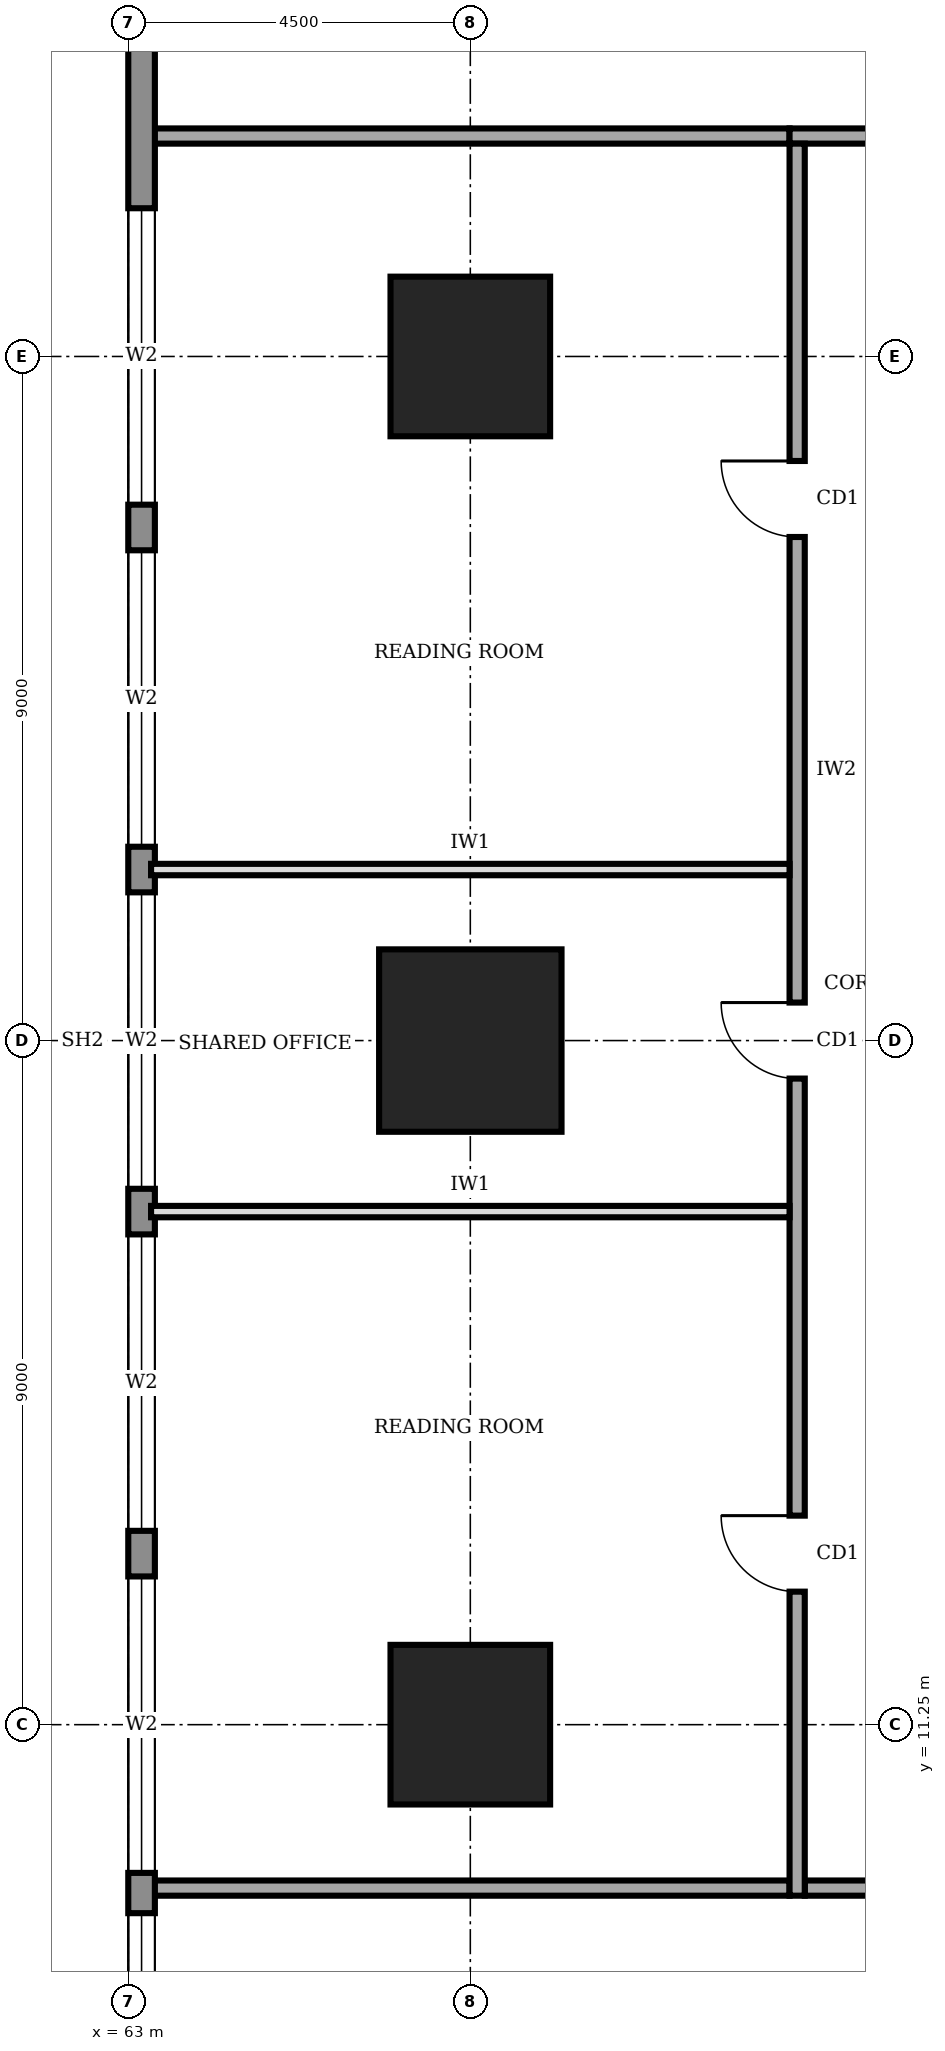
"""IFC4 building model, lengths in metres.
Left out: names, types, materials, properties, quantities, classifications, styles, units other than length and angle.
Written with IfcOpenShell. Run it as: python <this file> out.ifc"""

import sys

from ifc_helpers import new_model, si_unit, direction, frame, frame_2d, origin, origin_2d, place, context, subcontext, project, spatial, rectangle, extrude, element, fill, save


model = new_model("IFC4")
c1 = context("Model", 3, precision=1e-05, world=origin(), true_north=direction((0.0, 1.0)))
c2 = subcontext(c1, "Body", "Model", "MODEL_VIEW")
j1 = project(units=[si_unit("LENGTHUNIT", "METRE"), si_unit("PLANEANGLEUNIT", "RADIAN")], contexts=[c1])
p1 = place(None, origin())
s1 = spatial("IfcSite", under=j1, at=p1, CompositionType="ELEMENT")
p2 = place(p1, origin())
s2 = spatial("IfcBuilding", under=s1, at=p2, CompositionType="ELEMENT")
p3 = place(p2, frame((0.0, 0.0, 57.0)))
s3 = spatial("IfcBuildingStorey", under=s2, at=p3, CompositionType="ELEMENT", Elevation=57.0)
p4 = place(p3, frame((67.5, 11.25, 0.0), z_axis=(0.0, 0.0, 1.0), x_axis=(1.0, 0.0, 0.0)))
e1 = element("IfcColumn", 1, at=p4, inside=s3, PredefinedType="COLUMN", context=c2, shape_type="SweptSolid", body=[
    extrude(rectangle(XDim=2.1, YDim=2.1, at=origin_2d()), origin(), (0.0, 0.0, 1.0), 4.0),
])
p5 = place(p3, frame((67.5, 20.25, 0.0), z_axis=(0.0, 0.0, 1.0), x_axis=(1.0, 0.0, 0.0)))
e2 = element("IfcColumn", 2, at=p5, inside=s3, PredefinedType="COLUMN", context=c2, shape_type="SweptSolid", body=[
    extrude(rectangle(XDim=2.4, YDim=2.4, at=origin_2d()), origin(), (0.0, 0.0, 1.0), 4.0),
])
p6 = place(p3, frame((67.5, 29.25, 0.0), z_axis=(0.0, 0.0, 1.0), x_axis=(1.0, 0.0, 0.0)))
e3 = element("IfcColumn", 3, at=p6, inside=s3, PredefinedType="COLUMN", context=c2, shape_type="SweptSolid", body=[
    extrude(rectangle(XDim=2.1, YDim=2.1, at=origin_2d()), origin(), (0.0, 0.0, 1.0), 4.0),
])
p7 = place(p3, frame((63.175, 35.98, 0.0), z_axis=(0.0, 0.0, 1.0), x_axis=(0.0, -1.0, 0.0)))
e4 = element("IfcWall", 4, at=p7, inside=s3, PredefinedType="STANDARD", context=c2, shape_type="SweptSolid", body=[
    extrude(rectangle(XDim=31.46, YDim=0.35, at=frame_2d((15.73, 0.0))), origin(), (0.0, 0.0, 1.0), 3.75),
])
p8 = place(p7, frame((27.21, 0.0, 0.6)))
e5 = element("IfcOpeningElement", 5, at=p8, cuts=e4, PredefinedType="OPENING", context=c2, shape_type="SweptSolid", body=[
    extrude(rectangle(XDim=3.9, YDim=2.6, at=frame_2d((1.95, 1.3))), frame((0.0, 0.185, 0.0), z_axis=(0.0, -1.0, 0.0), x_axis=(1.0, 0.0, 0.0)), (0.0, 0.0, 1.0), 0.37),
])
p9 = place(p7, frame((22.78, 0.0, 0.6)))
e6 = element("IfcOpeningElement", 6, at=p9, cuts=e4, PredefinedType="OPENING", context=c2, shape_type="SweptSolid", body=[
    extrude(rectangle(XDim=3.9, YDim=2.6, at=frame_2d((1.95, 1.3))), frame((0.0, 0.185, 0.0), z_axis=(0.0, -1.0, 0.0), x_axis=(1.0, 0.0, 0.0)), (0.0, 0.0, 1.0), 0.37),
])
p10 = place(p7, frame((18.28, 0.0, 0.6)))
e7 = element("IfcOpeningElement", 7, at=p10, cuts=e4, PredefinedType="OPENING", context=c2, shape_type="SweptSolid", body=[
    extrude(rectangle(XDim=3.9, YDim=2.6, at=frame_2d((1.95, 1.3))), frame((0.0, 0.185, 0.0), z_axis=(0.0, -1.0, 0.0), x_axis=(1.0, 0.0, 0.0)), (0.0, 0.0, 1.0), 0.37),
])
p11 = place(p7, frame((13.78, 0.0, 0.6)))
e8 = element("IfcOpeningElement", 8, at=p11, cuts=e4, PredefinedType="OPENING", context=c2, shape_type="SweptSolid", body=[
    extrude(rectangle(XDim=3.9, YDim=2.6, at=frame_2d((1.95, 1.3))), frame((0.0, 0.185, 0.0), z_axis=(0.0, -1.0, 0.0), x_axis=(1.0, 0.0, 0.0)), (0.0, 0.0, 1.0), 0.37),
])
p12 = place(p7, frame((9.28, 0.0, 0.6)))
e9 = element("IfcOpeningElement", 9, at=p12, cuts=e4, PredefinedType="OPENING", context=c2, shape_type="SweptSolid", body=[
    extrude(rectangle(XDim=3.9, YDim=2.6, at=frame_2d((1.95, 1.3))), frame((0.0, 0.185, 0.0), z_axis=(0.0, -1.0, 0.0), x_axis=(1.0, 0.0, 0.0)), (0.0, 0.0, 1.0), 0.37),
])
p13 = place(p7, frame((4.78, 0.0, 0.6)))
e10 = element("IfcOpeningElement", 10, at=p13, cuts=e4, PredefinedType="OPENING", context=c2, shape_type="SweptSolid", body=[
    extrude(rectangle(XDim=3.9, YDim=2.6, at=frame_2d((1.95, 1.3))), frame((0.0, 0.185, 0.0), z_axis=(0.0, -1.0, 0.0), x_axis=(1.0, 0.0, 0.0)), (0.0, 0.0, 1.0), 0.37),
])
p14 = place(p3, frame((71.9, 9.1, 0.0), z_axis=(0.0, 0.0, 1.0), x_axis=(1.0, 0.0, 0.0)))
e11 = element("IfcWall", 11, at=p14, inside=s3, PredefinedType="SOLIDWALL", context=c2, shape_type="SweptSolid", body=[
    extrude(rectangle(XDim=17.65, YDim=0.2, at=frame_2d((8.825, 0.0))), origin(), (0.0, 0.0, 1.0), 3.75),
])
p15 = place(p14, frame((5.8, 0.0, 0.0)))
e12 = element("IfcOpeningElement", 12, at=p15, cuts=e11, PredefinedType="OPENING", context=c2, shape_type="SweptSolid", body=[
    extrude(rectangle(XDim=1.8, YDim=2.1, at=frame_2d((0.9, 1.05))), frame((0.0, 0.11, 0.0), z_axis=(0.0, -1.0, 0.0), x_axis=(1.0, 0.0, 0.0)), (0.0, 0.0, 1.0), 0.22),
])
p16 = place(p14, frame((14.725, 0.0, 0.0)))
e13 = element("IfcOpeningElement", 13, at=p16, cuts=e11, PredefinedType="OPENING", context=c2, shape_type="SweptSolid", body=[
    extrude(rectangle(XDim=1.8, YDim=2.1, at=frame_2d((0.9, 1.05))), frame((0.0, 0.11, 0.0), z_axis=(0.0, -1.0, 0.0), x_axis=(1.0, 0.0, 0.0)), (0.0, 0.0, 1.0), 0.22),
])
p17 = place(p3, frame((89.35, 32.15, 0.0), z_axis=(0.0, 0.0, 1.0), x_axis=(-1.0, 0.0, 0.0)))
e14 = element("IfcWall", 14, at=p17, inside=s3, PredefinedType="SOLIDWALL", context=c2, shape_type="SweptSolid", body=[
    extrude(rectangle(XDim=17.65, YDim=0.2, at=frame_2d((8.825, 0.0))), origin(), (0.0, 0.0, 1.0), 3.75),
])
p18 = place(p17, frame((14.75, 0.0, 0.0)))
e15 = element("IfcOpeningElement", 15, at=p18, cuts=e14, PredefinedType="OPENING", context=c2, shape_type="SweptSolid", body=[
    extrude(rectangle(XDim=1.0, YDim=2.1, at=frame_2d((0.5, 1.05))), frame((0.0, 0.11, 0.0), z_axis=(0.0, -1.0, 0.0), x_axis=(1.0, 0.0, 0.0)), (0.0, 0.0, 1.0), 0.22),
])
p19 = place(p17, frame((7.85, 0.0, 0.0)))
e16 = element("IfcOpeningElement", 16, at=p19, cuts=e14, PredefinedType="OPENING", context=c2, shape_type="SweptSolid", body=[
    extrude(rectangle(XDim=1.0, YDim=2.1, at=frame_2d((0.5, 1.05))), frame((0.0, 0.11, 0.0), z_axis=(0.0, -1.0, 0.0), x_axis=(1.0, 0.0, 0.0)), (0.0, 0.0, 1.0), 0.22),
])
p20 = place(p17, frame((1.325, 0.0, 0.0)))
e17 = element("IfcOpeningElement", 17, at=p20, cuts=e14, PredefinedType="OPENING", context=c2, shape_type="SweptSolid", body=[
    extrude(rectangle(XDim=1.0, YDim=2.1, at=frame_2d((0.5, 1.05))), frame((0.0, 0.11, 0.0), z_axis=(0.0, -1.0, 0.0), x_axis=(1.0, 0.0, 0.0)), (0.0, 0.0, 1.0), 0.22),
])
p21 = place(p3, frame((71.8, 32.05, 0.0), z_axis=(0.0, 0.0, 1.0), x_axis=(0.0, -1.0, 0.0)))
e18 = element("IfcWall", 18, at=p21, inside=s3, PredefinedType="SOLIDWALL", context=c2, shape_type="SweptSolid", body=[
    extrude(rectangle(XDim=23.05, YDim=0.2, at=frame_2d((11.525, 0.0))), origin(), (0.0, 0.0, 1.0), 3.75),
])
p22 = place(p21, frame((18.05, 0.0, 0.0)))
e19 = element("IfcOpeningElement", 19, at=p22, cuts=e18, PredefinedType="OPENING", context=c2, shape_type="SweptSolid", body=[
    extrude(rectangle(XDim=1.0, YDim=2.1, at=frame_2d((0.5, 1.05))), frame((0.0, 0.11, 0.0), z_axis=(0.0, -1.0, 0.0), x_axis=(1.0, 0.0, 0.0)), (0.0, 0.0, 1.0), 0.22),
])
p23 = place(p21, frame((11.3, 0.0, 0.0)))
e20 = element("IfcOpeningElement", 20, at=p23, cuts=e18, PredefinedType="OPENING", context=c2, shape_type="SweptSolid", body=[
    extrude(rectangle(XDim=1.0, YDim=2.1, at=frame_2d((0.5, 1.05))), frame((0.0, 0.11, 0.0), z_axis=(0.0, -1.0, 0.0), x_axis=(1.0, 0.0, 0.0)), (0.0, 0.0, 1.0), 0.22),
])
p24 = place(p21, frame((4.175, 0.0, 0.0)))
e21 = element("IfcOpeningElement", 21, at=p24, cuts=e18, PredefinedType="OPENING", context=c2, shape_type="SweptSolid", body=[
    extrude(rectangle(XDim=1.0, YDim=2.1, at=frame_2d((0.5, 1.05))), frame((0.0, 0.11, 0.0), z_axis=(0.0, -1.0, 0.0), x_axis=(1.0, 0.0, 0.0)), (0.0, 0.0, 1.0), 0.22),
])
for number, where, z_axis, x_axis in (
    (22, (63.3, 9.1, 0.0), (0.0, 0.0, 1.0), (1.0, 0.0, 0.0)),
    (23, (63.3, 32.15, 0.0), (0.0, 0.0, 1.0), (1.0, 0.0, 0.0)),
):
    element("IfcWall", number, at=place(p3, frame(where, z_axis=z_axis, x_axis=x_axis)), inside=s3, PredefinedType="SOLIDWALL", context=c2, shape_type="SweptSolid", body=[
        extrude(rectangle(XDim=8.4, YDim=0.2, at=frame_2d((4.2, 0.0))), origin(), (0.0, 0.0, 1.0), 3.75),
    ])
for number, where, z_axis, x_axis in (
    (24, (63.3, 18.0, 0.0), (0.0, 0.0, 1.0), (1.0, 0.0, 0.0)),
    (25, (63.3, 22.5, 0.0), (0.0, 0.0, 1.0), (1.0, 0.0, 0.0)),
):
    element("IfcWall", number, at=place(p3, frame(where, z_axis=z_axis, x_axis=x_axis)), inside=s3, PredefinedType="PARTITIONING", context=c2, shape_type="SweptSolid", body=[
        extrude(rectangle(XDim=8.4, YDim=0.15, at=frame_2d((4.2, 0.0))), origin(), (0.0, 0.0, 1.0), 3.75),
    ])
p25 = place(p8, origin())
e26 = element("IfcWindow", 26, at=p25, inside=s3, PartitioningType="SINGLE_PANEL", PredefinedType="WINDOW", context=c2, shape_type="SweptSolid", body=[
    extrude(rectangle(XDim=3.9, YDim=2.6, at=frame_2d((1.95, 1.3))), frame((0.0, 0.03, 0.0), z_axis=(0.0, -1.0, 0.0), x_axis=(1.0, 0.0, 0.0)), (0.0, 0.0, 1.0), 0.06),
])
fill(e5, e26)
p26 = place(p9, origin())
e27 = element("IfcWindow", 27, at=p26, inside=s3, PartitioningType="SINGLE_PANEL", PredefinedType="WINDOW", context=c2, shape_type="SweptSolid", body=[
    extrude(rectangle(XDim=3.9, YDim=2.6, at=frame_2d((1.95, 1.3))), frame((0.0, 0.03, 0.0), z_axis=(0.0, -1.0, 0.0), x_axis=(1.0, 0.0, 0.0)), (0.0, 0.0, 1.0), 0.06),
])
fill(e6, e27)
p27 = place(p10, origin())
e28 = element("IfcWindow", 28, at=p27, inside=s3, PartitioningType="SINGLE_PANEL", PredefinedType="WINDOW", context=c2, shape_type="SweptSolid", body=[
    extrude(rectangle(XDim=3.9, YDim=2.6, at=frame_2d((1.95, 1.3))), frame((0.0, 0.03, 0.0), z_axis=(0.0, -1.0, 0.0), x_axis=(1.0, 0.0, 0.0)), (0.0, 0.0, 1.0), 0.06),
])
fill(e7, e28)
p28 = place(p11, origin())
e29 = element("IfcWindow", 29, at=p28, inside=s3, PartitioningType="SINGLE_PANEL", PredefinedType="WINDOW", context=c2, shape_type="SweptSolid", body=[
    extrude(rectangle(XDim=3.9, YDim=2.6, at=frame_2d((1.95, 1.3))), frame((0.0, 0.03, 0.0), z_axis=(0.0, -1.0, 0.0), x_axis=(1.0, 0.0, 0.0)), (0.0, 0.0, 1.0), 0.06),
])
fill(e8, e29)
p29 = place(p12, origin())
e30 = element("IfcWindow", 30, at=p29, inside=s3, PartitioningType="SINGLE_PANEL", PredefinedType="WINDOW", context=c2, shape_type="SweptSolid", body=[
    extrude(rectangle(XDim=3.9, YDim=2.6, at=frame_2d((1.95, 1.3))), frame((0.0, 0.03, 0.0), z_axis=(0.0, -1.0, 0.0), x_axis=(1.0, 0.0, 0.0)), (0.0, 0.0, 1.0), 0.06),
])
fill(e9, e30)
p30 = place(p13, origin())
e31 = element("IfcWindow", 31, at=p30, inside=s3, PartitioningType="SINGLE_PANEL", PredefinedType="WINDOW", context=c2, shape_type="SweptSolid", body=[
    extrude(rectangle(XDim=3.9, YDim=2.6, at=frame_2d((1.95, 1.3))), frame((0.0, 0.03, 0.0), z_axis=(0.0, -1.0, 0.0), x_axis=(1.0, 0.0, 0.0)), (0.0, 0.0, 1.0), 0.06),
])
fill(e10, e31)
p31 = place(p22, frame((1.0, 0.0, 0.0), z_axis=(0.0, 0.0, 1.0), x_axis=(-1.0, 0.0, 0.0)))
e32 = element("IfcDoor", 32, at=p31, inside=s3, OperationType="SINGLE_SWING_RIGHT", PredefinedType="DOOR", context=c2, shape_type="SweptSolid", body=[
    extrude(rectangle(XDim=1.0, YDim=2.1, at=frame_2d((0.5, 1.05))), frame((0.0, 0.025, 0.0), z_axis=(0.0, -1.0, 0.0), x_axis=(1.0, 0.0, 0.0)), (0.0, 0.0, 1.0), 0.05),
])
fill(e19, e32)
p32 = place(p23, frame((1.0, 0.0, 0.0), z_axis=(0.0, 0.0, 1.0), x_axis=(-1.0, 0.0, 0.0)))
e33 = element("IfcDoor", 33, at=p32, inside=s3, OperationType="SINGLE_SWING_RIGHT", PredefinedType="DOOR", context=c2, shape_type="SweptSolid", body=[
    extrude(rectangle(XDim=1.0, YDim=2.1, at=frame_2d((0.5, 1.05))), frame((0.0, 0.025, 0.0), z_axis=(0.0, -1.0, 0.0), x_axis=(1.0, 0.0, 0.0)), (0.0, 0.0, 1.0), 0.05),
])
fill(e20, e33)
p33 = place(p24, frame((1.0, 0.0, 0.0), z_axis=(0.0, 0.0, 1.0), x_axis=(-1.0, 0.0, 0.0)))
e34 = element("IfcDoor", 34, at=p33, inside=s3, OperationType="SINGLE_SWING_RIGHT", PredefinedType="DOOR", context=c2, shape_type="SweptSolid", body=[
    extrude(rectangle(XDim=1.0, YDim=2.1, at=frame_2d((0.5, 1.05))), frame((0.0, 0.025, 0.0), z_axis=(0.0, -1.0, 0.0), x_axis=(1.0, 0.0, 0.0)), (0.0, 0.0, 1.0), 0.05),
])
fill(e21, e34)
save(model, sys.argv[1])
